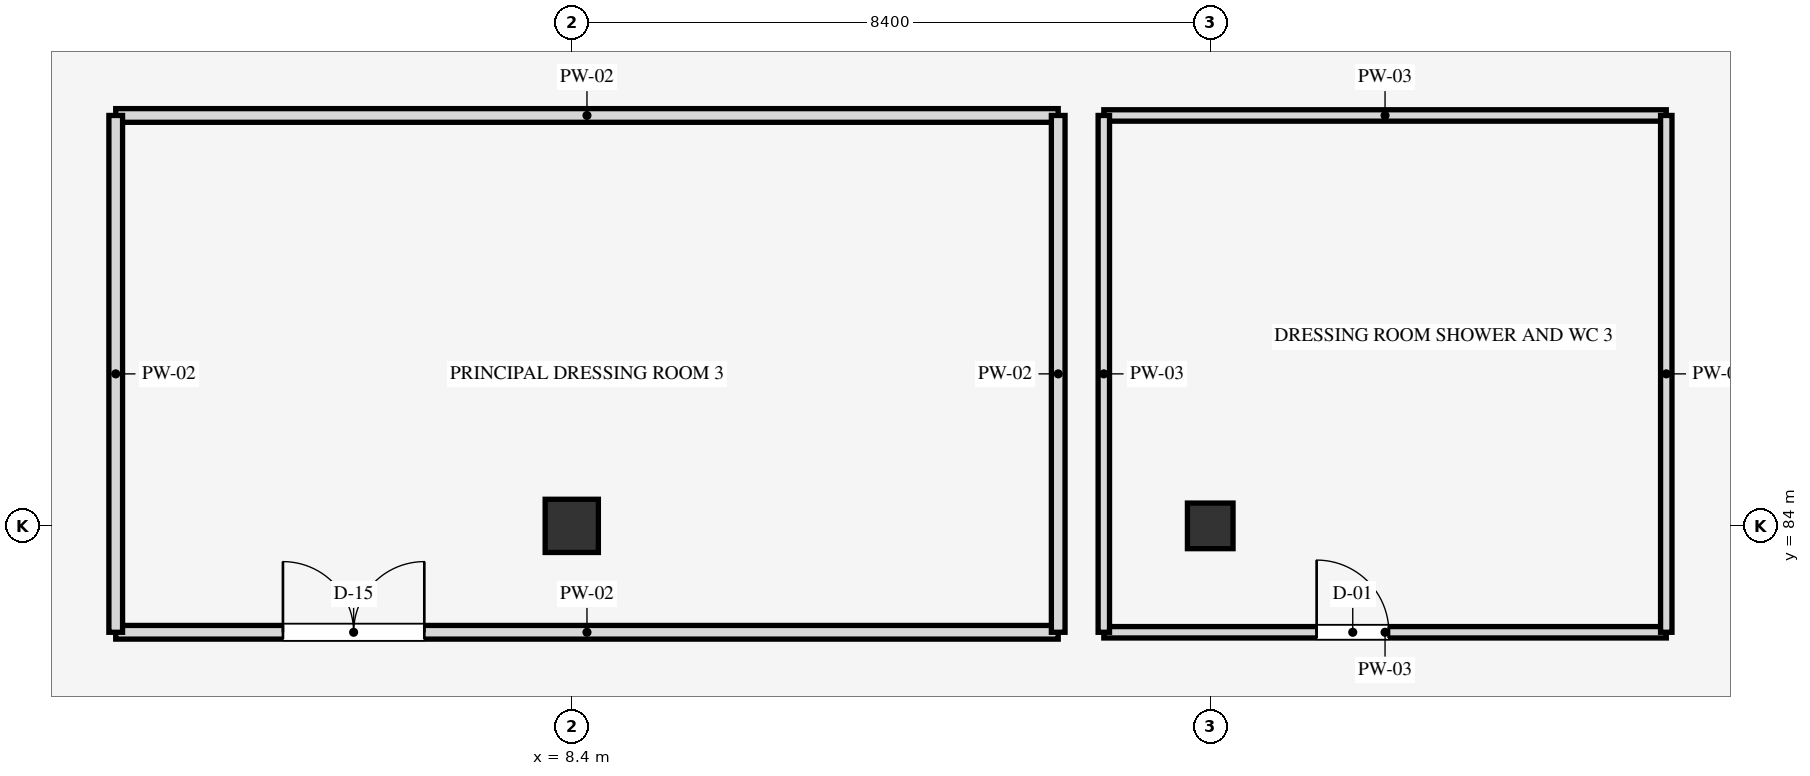
"""IFC4 building model, lengths in metres.
Left out: names, types, materials, properties, quantities, classifications, styles, units other than length and angle.
Written with IfcOpenShell. Run it as: python <this file> out.ifc"""

import sys

from ifc_helpers import new_model, si_unit, direction, frame, frame_2d, origin, origin_2d, place, context, subcontext, project, spatial, rectangle, extrude, element, fill, save


model = new_model("IFC4")
c1 = context("Model", 3, precision=1e-05, world=origin(), true_north=direction((0.0, 1.0)))
c2 = subcontext(c1, "Body", "Model", "MODEL_VIEW")
j1 = project(units=[si_unit("LENGTHUNIT", "METRE"), si_unit("PLANEANGLEUNIT", "RADIAN")], contexts=[c1])
p1 = place(None, origin())
s1 = spatial("IfcSite", under=j1, at=p1, CompositionType="ELEMENT")
p2 = place(p1, origin())
s2 = spatial("IfcBuilding", under=s1, at=p2, CompositionType="ELEMENT")
p3 = place(p2, frame((0.0, 0.0, 5.4)))
s3 = spatial("IfcBuildingStorey", under=s2, at=p3, CompositionType="ELEMENT", Elevation=5.4)
p4 = place(p3, frame((8.4, 84.0, 0.0), z_axis=(0.0, 0.0, 1.0), x_axis=(1.0, 0.0, 0.0)))
e1 = element("IfcColumn", 1, at=p4, inside=s3, PredefinedType="COLUMN", context=c2, shape_type="SweptSolid", body=[
    extrude(rectangle(XDim=0.7, YDim=0.7, at=origin_2d()), origin(), (0.0, 0.0, 1.0), 4.5),
])
p5 = place(p3, frame((16.8, 84.0, 0.0), z_axis=(0.0, 0.0, 1.0), x_axis=(1.0, 0.0, 0.0)))
e2 = element("IfcColumn", 2, at=p5, inside=s3, PredefinedType="COLUMN", context=c2, shape_type="SweptSolid", body=[
    extrude(rectangle(XDim=0.6, YDim=0.6, at=origin_2d()), origin(), (0.0, 0.0, 1.0), 4.5),
])
p6 = place(p3, frame((2.4, 82.6, 0.0), z_axis=(0.0, 0.0, 1.0), x_axis=(1.0, 0.0, 0.0)))
e3 = element("IfcWall", 3, at=p6, inside=s3, PredefinedType="PARTITIONING", context=c2, shape_type="SweptSolid", body=[
    extrude(rectangle(XDim=12.4, YDim=0.18, at=frame_2d((6.2, 0.0))), origin(), (0.0, 0.0, 1.0), 3.54),
])
p7 = place(p6, frame((2.2, 0.0, 0.0)))
e4 = element("IfcOpeningElement", 4, at=p7, cuts=e3, PredefinedType="OPENING", context=c2, shape_type="SweptSolid", body=[
    extrude(rectangle(XDim=1.86, YDim=2.26, at=frame_2d((0.93, 1.13))), frame((0.0, 0.1, 0.0), z_axis=(0.0, -1.0, 0.0), x_axis=(1.0, 0.0, 0.0)), (0.0, 0.0, 1.0), 0.2),
])
p8 = place(p3, frame((2.4, 89.4, 0.0), z_axis=(0.0, 0.0, 1.0), x_axis=(1.0, 0.0, 0.0)))
e5 = element("IfcWall", 5, at=p8, inside=s3, PredefinedType="PARTITIONING", context=c2, shape_type="SweptSolid", body=[
    extrude(rectangle(XDim=12.4, YDim=0.18, at=frame_2d((6.2, 0.0))), origin(), (0.0, 0.0, 1.0), 3.54),
])
for number, where, z_axis, x_axis in (
    (6, (2.4, 82.6, 0.0), (0.0, 0.0, 1.0), (0.0, 1.0, 0.0)),
    (7, (14.8, 82.6, 0.0), (0.0, 0.0, 1.0), (0.0, 1.0, 0.0)),
):
    element("IfcWall", number, at=place(p3, frame(where, z_axis=z_axis, x_axis=x_axis)), inside=s3, PredefinedType="PARTITIONING", context=c2, shape_type="SweptSolid", body=[
        extrude(rectangle(XDim=6.8, YDim=0.18, at=frame_2d((3.4, 0.0))), origin(), (0.0, 0.0, 1.0), 3.54),
    ])
p9 = place(p3, frame((15.4, 82.6, 0.0), z_axis=(0.0, 0.0, 1.0), x_axis=(1.0, 0.0, 0.0)))
e8 = element("IfcWall", 8, at=p9, inside=s3, PredefinedType="PARTITIONING", context=c2, shape_type="SweptSolid", body=[
    extrude(rectangle(XDim=7.4, YDim=0.15, at=frame_2d((3.7, 0.0))), origin(), (0.0, 0.0, 1.0), 3.54),
])
p10 = place(p9, frame((2.8, 0.0, 0.0)))
e9 = element("IfcOpeningElement", 9, at=p10, cuts=e8, PredefinedType="OPENING", context=c2, shape_type="SweptSolid", body=[
    extrude(rectangle(XDim=0.95, YDim=2.1, at=frame_2d((0.475, 1.05))), frame((0.0, 0.085, 0.0), z_axis=(0.0, -1.0, 0.0), x_axis=(1.0, 0.0, 0.0)), (0.0, 0.0, 1.0), 0.17),
])
p11 = place(p3, frame((15.4, 89.4, 0.0), z_axis=(0.0, 0.0, 1.0), x_axis=(1.0, 0.0, 0.0)))
e10 = element("IfcWall", 10, at=p11, inside=s3, PredefinedType="PARTITIONING", context=c2, shape_type="SweptSolid", body=[
    extrude(rectangle(XDim=7.4, YDim=0.15, at=frame_2d((3.7, 0.0))), origin(), (0.0, 0.0, 1.0), 3.54),
])
for number, where, z_axis, x_axis in (
    (11, (15.4, 82.6, 0.0), (0.0, 0.0, 1.0), (0.0, 1.0, 0.0)),
    (12, (22.8, 82.6, 0.0), (0.0, 0.0, 1.0), (0.0, 1.0, 0.0)),
):
    element("IfcWall", number, at=place(p3, frame(where, z_axis=z_axis, x_axis=x_axis)), inside=s3, PredefinedType="PARTITIONING", context=c2, shape_type="SweptSolid", body=[
        extrude(rectangle(XDim=6.8, YDim=0.15, at=frame_2d((3.4, 0.0))), origin(), (0.0, 0.0, 1.0), 3.54),
    ])
p12 = place(p7, origin())
e13 = element("IfcDoor", 13, at=p12, inside=s3, OperationType="DOUBLE_DOOR_SINGLE_SWING", PredefinedType="DOOR", context=c2, shape_type="SweptSolid", body=[
    extrude(rectangle(XDim=1.86, YDim=2.26, at=frame_2d((0.93, 1.13))), frame((0.0, 0.025, 0.0), z_axis=(0.0, -1.0, 0.0), x_axis=(1.0, 0.0, 0.0)), (0.0, 0.0, 1.0), 0.05),
])
fill(e4, e13)
p13 = place(p10, origin())
e14 = element("IfcDoor", 14, at=p13, inside=s3, OperationType="SINGLE_SWING_LEFT", PredefinedType="DOOR", context=c2, shape_type="SweptSolid", body=[
    extrude(rectangle(XDim=0.95, YDim=2.1, at=frame_2d((0.475, 1.05))), frame((0.0, 0.025, 0.0), z_axis=(0.0, -1.0, 0.0), x_axis=(1.0, 0.0, 0.0)), (0.0, 0.0, 1.0), 0.05),
])
fill(e9, e14)
save(model, sys.argv[1])
